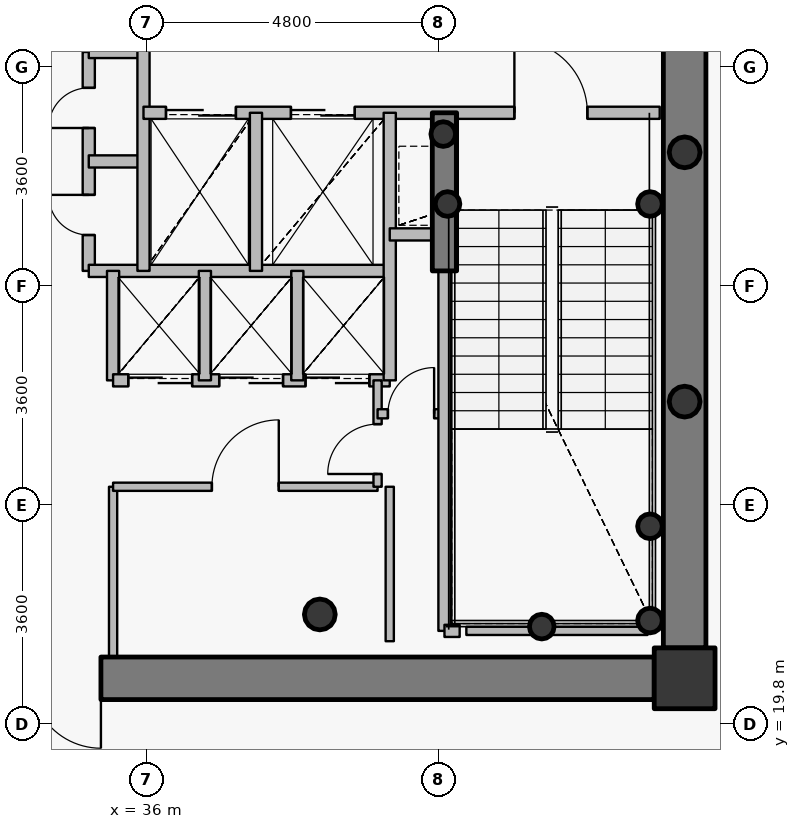
"""IFC4 building model, lengths in metres.
Left out: names, types, materials, properties, quantities, classifications, styles, units other than length and angle.
Written with IfcOpenShell. Run it as: python <this file> out.ifc"""

import sys

from ifc_helpers import new_model, si_unit, direction, frame, frame_2d, origin, origin_2d, place, context, subcontext, project, spatial, rectangle, hollow_circle, extrude, source, transform, mapped, element, fill, save


model = new_model("IFC4")
c1 = context("Model", 3, precision=1e-05, world=origin(), true_north=direction((0.0, 1.0)))
c2 = subcontext(c1, "Body", "Model", "MODEL_VIEW")
j1 = project(units=[si_unit("LENGTHUNIT", "METRE"), si_unit("PLANEANGLEUNIT", "RADIAN")], contexts=[c1])
p1 = place(None, origin())
s1 = spatial("IfcSite", under=j1, at=p1, CompositionType="ELEMENT")
p2 = place(p1, origin())
s2 = spatial("IfcBuilding", under=s1, at=p2, CompositionType="ELEMENT")
p3 = place(p2, frame((0.0, 0.0, 299.25)))
s3 = spatial("IfcBuildingStorey", under=s2, at=p3, CompositionType="ELEMENT", Elevation=299.25)
p4 = place(p3, frame((44.85, 20.55, 0.0), z_axis=(0.0, 0.0, 1.0), x_axis=(1.0, 0.0, 0.0)))
e1 = element("IfcColumn", 1, at=p4, inside=s3, PredefinedType="COLUMN", context=c2, shape_type="SweptSolid", body=[
    extrude(rectangle(XDim=1.0, YDim=1.0, at=origin_2d()), origin(), (0.0, 0.0, 1.0), 3.75),
])
p5 = place(p3, frame((38.85, 21.6, 0.0), z_axis=(0.0, 0.0, 1.0), x_axis=(1.0, 0.0, 0.0)))
e2 = element("IfcColumn", 2, at=p5, inside=s3, PredefinedType="COLUMN", context=c2, shape_type="SweptSolid", body=[
    extrude(hollow_circle(Radius=0.254, WallThickness=0.02, at=origin_2d()), origin(), (0.0, 0.0, 1.0), 3.75),
])
for number, where, z_axis, x_axis in (
    (3, (44.28, 21.5, 0.0), (0.0, 0.0, 1.0), (1.0, 0.0, 0.0)),
    (4, (44.28, 23.05, 0.0), (0.0, 0.0, 1.0), (1.0, 0.0, 0.0)),
    (5, (42.5, 21.4, 0.0), (0.0, 0.0, 1.0), (1.0, 0.0, 0.0)),
    (6, (40.95, 28.35, 0.0), (0.0, 0.0, 1.0), (1.0, 0.0, 0.0)),
    (7, (44.28, 28.35, 0.0), (0.0, 0.0, 1.0), (1.0, 0.0, 0.0)),
    (8, (40.88, 29.5, 0.0), (0.0, 0.0, 1.0), (1.0, 0.0, 0.0)),
):
    element("IfcColumn", number, at=place(p3, frame(where, z_axis=z_axis, x_axis=x_axis)), inside=s3, PredefinedType="COLUMN", context=c2, shape_type="SweptSolid", body=[
        extrude(hollow_circle(Radius=0.203, WallThickness=0.016, at=origin_2d()), origin(), (0.0, 0.0, 1.0), 3.75),
    ])
p6 = place(p3, frame((44.85, 32.95, 0.0), z_axis=(0.0, 0.0, 1.0), x_axis=(0.0, -1.0, 0.0)))
e9 = element("IfcWall", 9, at=p6, inside=s3, PredefinedType="SHEAR", context=c2, shape_type="SweptSolid", body=[
    extrude(rectangle(XDim=11.9, YDim=0.7, at=frame_2d((5.95, 0.0))), origin(), (0.0, 0.0, 1.0), 3.05),
])
p7 = place(p3, frame((44.35, 20.55, 0.0), z_axis=(0.0, 0.0, 1.0), x_axis=(-1.0, 0.0, 0.0)))
e10 = element("IfcWall", 10, at=p7, inside=s3, PredefinedType="SHEAR", context=c2, shape_type="SweptSolid", body=[
    extrude(rectangle(XDim=16.7, YDim=0.7, at=frame_2d((8.35, 0.0))), origin(), (0.0, 0.0, 1.0), 3.05),
])
p8 = place(p7, frame((12.925, 0.0, 0.0)))
e11 = element("IfcOpeningElement", 11, at=p8, cuts=e10, PredefinedType="OPENING", context=c2, shape_type="SweptSolid", body=[
    extrude(rectangle(XDim=1.15, YDim=2.15, at=origin_2d()), frame((0.575, 0.36, 1.075), z_axis=(0.0, -1.0, 0.0), x_axis=(1.0, 0.0, 0.0)), (0.0, 0.0, 1.0), 0.72),
])
p9 = place(p7, frame((9.1, 0.0, 0.0)))
e12 = element("IfcOpeningElement", 12, at=p9, cuts=e10, PredefinedType="OPENING", context=c2, shape_type="SweptSolid", body=[
    extrude(rectangle(XDim=1.15, YDim=2.15, at=origin_2d()), frame((0.575, 0.36, 1.075), z_axis=(0.0, -1.0, 0.0), x_axis=(1.0, 0.0, 0.0)), (0.0, 0.0, 1.0), 0.72),
])
p10 = place(p3, frame((40.9, 27.25, 0.0), z_axis=(0.0, 0.0, 1.0), x_axis=(0.0, 1.0, 0.0)))
e13 = element("IfcWall", 13, at=p10, inside=s3, PredefinedType="SHEAR", context=c2, shape_type="SweptSolid", body=[
    extrude(rectangle(XDim=2.6, YDim=0.4, at=frame_2d((1.3, 0.0))), origin(), (0.0, 0.0, 1.0), 3.1),
])
for number, where, z_axis, x_axis in (
    (14, (44.85, 25.1, 0.0), (0.0, 0.0, 1.0), (1.0, 0.0, 0.0)),
    (15, (44.85, 29.2, 0.0), (0.0, 0.0, 1.0), (1.0, 0.0, 0.0)),
):
    element("IfcColumn", number, at=place(p3, frame(where, z_axis=z_axis, x_axis=x_axis)), inside=s3, PredefinedType="COLUMN", context=c2, shape_type="SweptSolid", body=[
        extrude(hollow_circle(Radius=0.254, WallThickness=0.02, at=origin_2d()), origin(), (0.0, 0.0, 1.0), 3.75),
    ])
p11 = place(p3, frame((35.05, 27.25, 0.0), z_axis=(0.0, 0.0, 1.0), x_axis=(0.0, 1.0, 0.0)))
e16 = element("IfcWall", 16, at=p11, inside=s3, PredefinedType="PARTITIONING", context=c2, shape_type="SweptSolid", body=[
    extrude(rectangle(XDim=3.6, YDim=0.2, at=frame_2d((1.8, 0.0))), origin(), (0.0, 0.0, 1.0), 3.5),
])
p12 = place(p11, frame((0.59, 0.0, 0.0)))
e17 = element("IfcOpeningElement", 17, at=p12, cuts=e16, PredefinedType="OPENING", context=c2, shape_type="SweptSolid", body=[
    extrude(rectangle(XDim=0.66, YDim=2.05, at=origin_2d()), frame((0.33, 0.11, 1.025), z_axis=(0.0, -1.0, 0.0), x_axis=(1.0, 0.0, 0.0)), (0.0, 0.0, 1.0), 0.22),
])
p13 = place(p11, frame((2.35, 0.0, 0.0)))
e18 = element("IfcOpeningElement", 18, at=p13, cuts=e16, PredefinedType="OPENING", context=c2, shape_type="SweptSolid", body=[
    extrude(rectangle(XDim=0.66, YDim=2.05, at=origin_2d()), frame((0.33, 0.11, 1.025), z_axis=(0.0, -1.0, 0.0), x_axis=(1.0, 0.0, 0.0)), (0.0, 0.0, 1.0), 0.22),
])
p14 = place(p3, frame((35.05, 27.25, 0.0), z_axis=(0.0, 0.0, 1.0), x_axis=(1.0, 0.0, 0.0)))
e19 = element("IfcWall", 19, at=p14, inside=s3, PredefinedType="PARTITIONING", context=c2, shape_type="SweptSolid", body=[
    extrude(rectangle(XDim=4.95, YDim=0.2, at=frame_2d((2.475, 0.0))), origin(), (0.0, 0.0, 1.0), 3.085),
])
for number, where, z_axis, x_axis in (
    (20, (35.05, 29.05, 0.0), (0.0, 0.0, 1.0), (1.0, 0.0, 0.0)),
    (21, (35.05, 30.85, 0.0), (0.0, 0.0, 1.0), (1.0, 0.0, 0.0)),
):
    element("IfcWall", number, at=place(p3, frame(where, z_axis=z_axis, x_axis=x_axis)), inside=s3, PredefinedType="PARTITIONING", context=c2, shape_type="SweptSolid", body=[
        extrude(rectangle(XDim=0.9, YDim=0.2, at=frame_2d((0.45, 0.0))), origin(), (0.0, 0.0, 1.0), 3.5),
    ])
p15 = place(p3, frame((35.45, 20.9, 0.0), z_axis=(0.0, 0.0, 1.0), x_axis=(0.0, 1.0, 0.0)))
e22 = element("IfcWall", 22, at=p15, inside=s3, PredefinedType="PARTITIONING", context=c2, shape_type="SweptSolid", body=[
    extrude(rectangle(XDim=2.8, YDim=0.135, at=frame_2d((1.4, 0.0))), origin(), (0.0, 0.0, 1.0), 3.085),
])
p16 = place(p3, frame((35.45, 23.7, 0.0), z_axis=(0.0, 0.0, 1.0), x_axis=(1.0, 0.0, 0.0)))
e23 = element("IfcWall", 23, at=p16, inside=s3, PredefinedType="PARTITIONING", context=c2, shape_type="SweptSolid", body=[
    extrude(rectangle(XDim=4.35, YDim=0.135, at=frame_2d((2.175, 0.0))), origin(), (0.0, 0.0, 1.0), 3.085),
])
p17 = place(p16, frame((1.625, 0.0, 0.0)))
e24 = element("IfcOpeningElement", 24, at=p17, cuts=e23, PredefinedType="OPENING", context=c2, shape_type="SweptSolid", body=[
    extrude(rectangle(XDim=1.1, YDim=2.15, at=origin_2d()), frame((0.55, 0.078, 1.075), z_axis=(0.0, -1.0, 0.0), x_axis=(1.0, 0.0, 0.0)), (0.0, 0.0, 1.0), 0.155),
])
p18 = place(p3, frame((35.45, 25.45, 0.0), z_axis=(0.0, 0.0, 1.0), x_axis=(0.0, 1.0, 0.0)))
e25 = element("IfcWall", 25, at=p18, inside=s3, PredefinedType="PARTITIONING", context=c2, shape_type="SweptSolid", body=[
    extrude(rectangle(XDim=1.8, YDim=0.2, at=frame_2d((0.9, 0.0))), origin(), (0.0, 0.0, 1.0), 3.5),
])
p19 = place(p3, frame((35.45, 25.45, 0.0), z_axis=(0.0, 0.0, 1.0), x_axis=(1.0, 0.0, 0.0)))
e26 = element("IfcWall", 26, at=p19, inside=s3, PredefinedType="PARTITIONING", context=c2, shape_type="SweptSolid", body=[
    extrude(rectangle(XDim=4.55, YDim=0.2, at=frame_2d((2.275, 0.0))), origin(), (0.0, 0.0, 1.0), 3.085),
])
p20 = place(p19, frame((0.25, 0.0, 0.0)))
e27 = element("IfcOpeningElement", 27, at=p20, cuts=e26, PredefinedType="OPENING", context=c2, shape_type="SweptSolid", body=[
    extrude(rectangle(XDim=1.05, YDim=2.15, at=origin_2d()), frame((0.525, 0.11, 1.075), z_axis=(0.0, -1.0, 0.0), x_axis=(1.0, 0.0, 0.0)), (0.0, 0.0, 1.0), 0.22),
])
p21 = place(p19, frame((1.745, 0.0, 0.0)))
e28 = element("IfcOpeningElement", 28, at=p21, cuts=e26, PredefinedType="OPENING", context=c2, shape_type="SweptSolid", body=[
    extrude(rectangle(XDim=1.05, YDim=2.15, at=origin_2d()), frame((0.525, 0.11, 1.075), z_axis=(0.0, -1.0, 0.0), x_axis=(1.0, 0.0, 0.0)), (0.0, 0.0, 1.0), 0.22),
])
p22 = place(p19, frame((3.165, 0.0, 0.0)))
e29 = element("IfcOpeningElement", 29, at=p22, cuts=e26, PredefinedType="OPENING", context=c2, shape_type="SweptSolid", body=[
    extrude(rectangle(XDim=1.05, YDim=2.15, at=origin_2d()), frame((0.525, 0.11, 1.075), z_axis=(0.0, -1.0, 0.0), x_axis=(1.0, 0.0, 0.0)), (0.0, 0.0, 1.0), 0.22),
])
p23 = place(p3, frame((35.95, 27.25, 0.0), z_axis=(0.0, 0.0, 1.0), x_axis=(0.0, 1.0, 0.0)))
e30 = element("IfcWall", 30, at=p23, inside=s3, PredefinedType="PARTITIONING", context=c2, shape_type="SweptSolid", body=[
    extrude(rectangle(XDim=3.8, YDim=0.2, at=frame_2d((1.9, 0.0))), origin(), (0.0, 0.0, 1.0), 3.5),
])
p24 = place(p3, frame((35.95, 29.85, 0.0), z_axis=(0.0, 0.0, 1.0), x_axis=(1.0, 0.0, 0.0)))
e31 = element("IfcWall", 31, at=p24, inside=s3, PredefinedType="PARTITIONING", context=c2, shape_type="SweptSolid", body=[
    extrude(rectangle(XDim=8.49, YDim=0.2, at=frame_2d((4.245, 0.0))), origin(), (0.0, 0.0, 1.0), 3.085),
])
p25 = place(p24, frame((6.1, 0.0, 0.0)))
e32 = element("IfcOpeningElement", 32, at=p25, cuts=e31, PredefinedType="OPENING", context=c2, shape_type="SweptSolid", body=[
    extrude(rectangle(XDim=1.2, YDim=2.15, at=origin_2d()), frame((0.6, 0.11, 1.075), z_axis=(0.0, -1.0, 0.0), x_axis=(1.0, 0.0, 0.0)), (0.0, 0.0, 1.0), 0.22),
])
p26 = place(p24, frame((0.37, 0.0, 0.0)))
e33 = element("IfcOpeningElement", 33, at=p26, cuts=e31, PredefinedType="OPENING", context=c2, shape_type="SweptSolid", body=[
    extrude(rectangle(XDim=1.15, YDim=2.15, at=origin_2d()), frame((0.575, 0.11, 1.075), z_axis=(0.0, -1.0, 0.0), x_axis=(1.0, 0.0, 0.0)), (0.0, 0.0, 1.0), 0.22),
])
p27 = place(p24, frame((2.425, 0.0, 0.0)))
e34 = element("IfcOpeningElement", 34, at=p27, cuts=e31, PredefinedType="OPENING", context=c2, shape_type="SweptSolid", body=[
    extrude(rectangle(XDim=1.05, YDim=2.15, at=origin_2d()), frame((0.525, 0.11, 1.075), z_axis=(0.0, -1.0, 0.0), x_axis=(1.0, 0.0, 0.0)), (0.0, 0.0, 1.0), 0.22),
])
p28 = place(p3, frame((36.96, 25.45, 0.0), z_axis=(0.0, 0.0, 1.0), x_axis=(0.0, 1.0, 0.0)))
e35 = element("IfcWall", 35, at=p28, inside=s3, PredefinedType="PARTITIONING", context=c2, shape_type="SweptSolid", body=[
    extrude(rectangle(XDim=1.8, YDim=0.2, at=frame_2d((0.9, 0.0))), origin(), (0.0, 0.0, 1.0), 3.5),
])
p29 = place(p3, frame((37.8, 27.25, 0.0), z_axis=(0.0, 0.0, 1.0), x_axis=(0.0, 1.0, 0.0)))
e36 = element("IfcWall", 36, at=p29, inside=s3, PredefinedType="PARTITIONING", context=c2, shape_type="SweptSolid", body=[
    extrude(rectangle(XDim=2.6, YDim=0.2, at=frame_2d((1.3, 0.0))), origin(), (0.0, 0.0, 1.0), 3.5),
])
p30 = place(p3, frame((38.48, 25.45, 0.0), z_axis=(0.0, 0.0, 1.0), x_axis=(0.0, 1.0, 0.0)))
e37 = element("IfcWall", 37, at=p30, inside=s3, PredefinedType="PARTITIONING", context=c2, shape_type="SweptSolid", body=[
    extrude(rectangle(XDim=1.8, YDim=0.2, at=frame_2d((0.9, 0.0))), origin(), (0.0, 0.0, 1.0), 3.5),
])
p31 = place(p3, frame((39.8, 23.7, 0.0), z_axis=(0.0, 0.0, 1.0), x_axis=(0.0, 1.0, 0.0)))
e38 = element("IfcWall", 38, at=p31, inside=s3, PredefinedType="PARTITIONING", context=c2, shape_type="SweptSolid", body=[
    extrude(rectangle(XDim=1.75, YDim=0.135, at=frame_2d((0.875, 0.0))), origin(), (0.0, 0.0, 1.0), 3.5),
])
p32 = place(p31, frame((0.21, 0.0, 0.0)))
e39 = element("IfcOpeningElement", 39, at=p32, cuts=e38, PredefinedType="OPENING", context=c2, shape_type="SweptSolid", body=[
    extrude(rectangle(XDim=0.82, YDim=2.1, at=origin_2d()), frame((0.41, 0.078, 1.05), z_axis=(0.0, -1.0, 0.0), x_axis=(1.0, 0.0, 0.0)), (0.0, 0.0, 1.0), 0.155),
])
p33 = place(p3, frame((39.8, 24.9, 0.0), z_axis=(0.0, 0.0, 1.0), x_axis=(1.0, 0.0, 0.0)))
e40 = element("IfcWall", 40, at=p33, inside=s3, PredefinedType="PARTITIONING", context=c2, shape_type="SweptSolid", body=[
    extrude(rectangle(XDim=1.1, YDim=0.15, at=frame_2d((0.55, 0.0))), origin(), (0.0, 0.0, 1.0), 3.5),
])
p34 = place(p33, frame((0.17, 0.0, 0.0)))
e41 = element("IfcOpeningElement", 41, at=p34, cuts=e40, PredefinedType="OPENING", context=c2, shape_type="SweptSolid", body=[
    extrude(rectangle(XDim=0.76, YDim=2.1, at=origin_2d()), frame((0.38, 0.085, 1.05), z_axis=(0.0, -1.0, 0.0), x_axis=(1.0, 0.0, 0.0)), (0.0, 0.0, 1.0), 0.17),
])
p35 = place(p3, frame((40.0, 25.45, 0.0), z_axis=(0.0, 0.0, 1.0), x_axis=(0.0, 1.0, 0.0)))
e42 = element("IfcWall", 42, at=p35, inside=s3, PredefinedType="PARTITIONING", context=c2, shape_type="SweptSolid", body=[
    extrude(rectangle(XDim=4.4, YDim=0.2, at=frame_2d((2.2, 0.0))), origin(), (0.0, 0.0, 1.0), 3.5),
])
p36 = place(p3, frame((40.0, 27.85, 0.0), z_axis=(0.0, 0.0, 1.0), x_axis=(1.0, 0.0, 0.0)))
e43 = element("IfcWall", 43, at=p36, inside=s3, PredefinedType="PARTITIONING", context=c2, shape_type="SweptSolid", body=[
    extrude(rectangle(XDim=0.9, YDim=0.2, at=frame_2d((0.45, 0.0))), origin(), (0.0, 0.0, 1.0), 3.5),
])
p37 = place(p3, frame((40.9, 21.33, 0.0), z_axis=(0.0, 0.0, 1.0), x_axis=(0.0, 1.0, 0.0)))
e44 = element("IfcWall", 44, at=p37, inside=s3, PredefinedType="PARTITIONING", context=c2, shape_type="SweptSolid", body=[
    extrude(rectangle(XDim=5.91, YDim=0.2, at=frame_2d((2.955, 0.0))), origin(), (0.0, 0.0, 1.0), 3.035),
])
p38 = place(p3, frame((40.9, 21.33, 0.0), z_axis=(0.0, 0.0, 1.0), x_axis=(1.0, 0.0, 0.0)))
e45 = element("IfcWall", 45, at=p38, inside=s3, PredefinedType="PARTITIONING", context=c2, shape_type="SweptSolid", body=[
    extrude(rectangle(XDim=0.25, YDim=0.2, at=frame_2d((0.125, 0.0))), origin(), (0.0, 0.0, 1.0), 3.035),
])
p39 = place(p3, frame((44.24, 21.33, 0.0), z_axis=(0.0, 0.0, 1.0), x_axis=(-1.0, 0.0, 0.0)))
e46 = element("IfcWall", 46, at=p39, inside=s3, PredefinedType="PARTITIONING", context=c2, shape_type="SweptSolid", body=[
    extrude(rectangle(XDim=2.98, YDim=0.135, at=frame_2d((1.49, 0.0))), origin(), (0.0, 0.0, 1.0), 3.035),
])
p40 = place(p3, frame((40.0, 23.7, 0.0), z_axis=(0.0, 0.0, 1.0), x_axis=(0.0, -1.0, 0.0)))
e47 = element("IfcWall", 47, at=p40, inside=s3, PredefinedType="PARTITIONING", context=c2, shape_type="SweptSolid", body=[
    extrude(rectangle(XDim=2.54, YDim=0.135, at=frame_2d((1.27, 0.0))), origin(), (0.0, 0.0, 1.0), 3.035),
])
p41 = place(p3, frame((44.36, 20.2, 0.0), z_axis=(0.0, 0.0, 1.0), x_axis=(1.0, 0.0, 0.0)))
e48 = element("IfcWall", 48, at=p41, inside=s3, PredefinedType="PARTITIONING", context=c2, shape_type="SweptSolid", body=[
    extrude(rectangle(XDim=0.84, YDim=0.135, at=frame_2d((0.42, 0.0))), origin(), (0.0, 0.0, 1.0), 3.035),
])
p42 = place(p3, frame((45.2, 20.508, 0.0), z_axis=(0.0, 0.0, 1.0), x_axis=(0.0, 1.0, 0.0)))
e49 = element("IfcWall", 49, at=p42, inside=s3, PredefinedType="PARTITIONING", context=c2, shape_type="SweptSolid", body=[
    extrude(rectangle(XDim=0.532, YDim=0.135, at=frame_2d((0.266, 0.0))), origin(), (0.0, 0.0, 1.0), 3.5),
])
m1 = source(origin(), c2, "Body", "SweptSolid", [
    extrude(rectangle(XDim=1.15, YDim=2.15, at=origin_2d()), frame((0.575, 0.025, 1.075), z_axis=(0.0, -1.0, 0.0), x_axis=(1.0, 0.0, 0.0)), (0.0, 0.0, 1.0), 0.05),
])
p43 = place(p9, origin())
e50 = element("IfcDoor", 50, at=p43, inside=s3, OperationType="SINGLE_SWING_LEFT", PredefinedType="DOOR", context=c2, shape_type="MappedRepresentation", body=[
    mapped(m1, transform((0.0, 0.0, 0.0), x_axis=(1.0, 0.0, 0.0), y_axis=(0.0, 1.0, 0.0), z_axis=(0.0, 0.0, 1.0), scale=1.0)),
])
fill(e12, e50)
m2 = source(origin(), c2, "Body", "SweptSolid", [
    extrude(rectangle(XDim=1.2, YDim=2.15, at=origin_2d()), frame((0.6, 0.025, 1.075), z_axis=(0.0, -1.0, 0.0), x_axis=(1.0, 0.0, 0.0)), (0.0, 0.0, 1.0), 0.05),
])
p44 = place(p25, origin())
e51 = element("IfcDoor", 51, at=p44, inside=s3, OperationType="SINGLE_SWING_LEFT", PredefinedType="DOOR", context=c2, shape_type="MappedRepresentation", body=[
    mapped(m2, transform((0.0, 0.0, 0.0), x_axis=(1.0, 0.0, 0.0), y_axis=(0.0, 1.0, 0.0), z_axis=(0.0, 0.0, 1.0), scale=1.0)),
])
fill(e32, e51)
m3 = source(origin(), c2, "Body", "SweptSolid", [
    extrude(rectangle(XDim=1.15, YDim=2.15, at=origin_2d()), frame((0.575, 0.025, 1.075), z_axis=(0.0, -1.0, 0.0), x_axis=(1.0, 0.0, 0.0)), (0.0, 0.0, 1.0), 0.05),
])
p45 = place(p26, origin())
e52 = element("IfcDoor", 52, at=p45, inside=s3, OperationType="DOUBLE_DOOR_SLIDING", PredefinedType="USERDEFINED", context=c2, shape_type="MappedRepresentation", body=[
    mapped(m3, transform((0.0, 0.0, 0.0), x_axis=(1.0, 0.0, 0.0), y_axis=(0.0, 1.0, 0.0), z_axis=(0.0, 0.0, 1.0), scale=1.0)),
])
fill(e33, e52)
m4 = source(origin(), c2, "Body", "SweptSolid", [
    extrude(rectangle(XDim=1.05, YDim=2.15, at=origin_2d()), frame((0.525, 0.025, 1.075), z_axis=(0.0, -1.0, 0.0), x_axis=(1.0, 0.0, 0.0)), (0.0, 0.0, 1.0), 0.05),
])
p46 = place(p27, origin())
e53 = element("IfcDoor", 53, at=p46, inside=s3, OperationType="DOUBLE_DOOR_SLIDING", PredefinedType="USERDEFINED", context=c2, shape_type="MappedRepresentation", body=[
    mapped(m4, transform((0.0, 0.0, 0.0), x_axis=(1.0, 0.0, 0.0), y_axis=(0.0, 1.0, 0.0), z_axis=(0.0, 0.0, 1.0), scale=1.0)),
])
fill(e34, e53)
p47 = place(p20, origin())
e54 = element("IfcDoor", 54, at=p47, inside=s3, OperationType="DOUBLE_DOOR_SLIDING", PredefinedType="USERDEFINED", context=c2, shape_type="MappedRepresentation", body=[
    mapped(m4, transform((0.0, 0.0, 0.0), x_axis=(1.0, 0.0, 0.0), y_axis=(0.0, 1.0, 0.0), z_axis=(0.0, 0.0, 1.0), scale=1.0)),
])
fill(e27, e54)
p48 = place(p21, origin())
e55 = element("IfcDoor", 55, at=p48, inside=s3, OperationType="DOUBLE_DOOR_SLIDING", PredefinedType="USERDEFINED", context=c2, shape_type="MappedRepresentation", body=[
    mapped(m4, transform((0.0, 0.0, 0.0), x_axis=(1.0, 0.0, 0.0), y_axis=(0.0, 1.0, 0.0), z_axis=(0.0, 0.0, 1.0), scale=1.0)),
])
fill(e28, e55)
p49 = place(p22, origin())
e56 = element("IfcDoor", 56, at=p49, inside=s3, OperationType="DOUBLE_DOOR_SLIDING", PredefinedType="USERDEFINED", context=c2, shape_type="MappedRepresentation", body=[
    mapped(m4, transform((0.0, 0.0, 0.0), x_axis=(1.0, 0.0, 0.0), y_axis=(0.0, 1.0, 0.0), z_axis=(0.0, 0.0, 1.0), scale=1.0)),
])
fill(e29, e56)
m5 = source(origin(), c2, "Body", "SweptSolid", [
    extrude(rectangle(XDim=0.66, YDim=2.05, at=origin_2d()), frame((0.33, 0.025, 1.025), z_axis=(0.0, -1.0, 0.0), x_axis=(1.0, 0.0, 0.0)), (0.0, 0.0, 1.0), 0.05),
])
p50 = place(p12, origin())
e57 = element("IfcDoor", 57, at=p50, inside=s3, OperationType="SINGLE_SWING_RIGHT", PredefinedType="USERDEFINED", context=c2, shape_type="MappedRepresentation", body=[
    mapped(m5, transform((0.0, 0.0, 0.0), x_axis=(1.0, 0.0, 0.0), y_axis=(0.0, 1.0, 0.0), z_axis=(0.0, 0.0, 1.0), scale=1.0)),
])
fill(e17, e57)
p51 = place(p13, origin())
e58 = element("IfcDoor", 58, at=p51, inside=s3, OperationType="SINGLE_SWING_LEFT", PredefinedType="USERDEFINED", context=c2, shape_type="MappedRepresentation", body=[
    mapped(m5, transform((0.0, 0.0, 0.0), x_axis=(1.0, 0.0, 0.0), y_axis=(0.0, 1.0, 0.0), z_axis=(0.0, 0.0, 1.0), scale=1.0)),
])
fill(e18, e58)
m6 = source(origin(), c2, "Body", "SweptSolid", [
    extrude(rectangle(XDim=1.1, YDim=2.15, at=origin_2d()), frame((0.55, 0.025, 1.075), z_axis=(0.0, -1.0, 0.0), x_axis=(1.0, 0.0, 0.0)), (0.0, 0.0, 1.0), 0.05),
])
p52 = place(p17, origin())
e59 = element("IfcDoor", 59, at=p52, inside=s3, OperationType="SINGLE_SWING_RIGHT", PredefinedType="DOOR", context=c2, shape_type="MappedRepresentation", body=[
    mapped(m6, transform((0.0, 0.0, 0.0), x_axis=(1.0, 0.0, 0.0), y_axis=(0.0, 1.0, 0.0), z_axis=(0.0, 0.0, 1.0), scale=1.0)),
])
fill(e24, e59)
m7 = source(origin(), c2, "Body", "SweptSolid", [
    extrude(rectangle(XDim=0.82, YDim=2.1, at=origin_2d()), frame((0.41, 0.025, 1.05), z_axis=(0.0, -1.0, 0.0), x_axis=(1.0, 0.0, 0.0)), (0.0, 0.0, 1.0), 0.05),
])
p53 = place(p32, origin())
e60 = element("IfcDoor", 60, at=p53, inside=s3, OperationType="SINGLE_SWING_LEFT", PredefinedType="DOOR", context=c2, shape_type="MappedRepresentation", body=[
    mapped(m7, transform((0.0, 0.0, 0.0), x_axis=(1.0, 0.0, 0.0), y_axis=(0.0, 1.0, 0.0), z_axis=(0.0, 0.0, 1.0), scale=1.0)),
])
fill(e39, e60)
m8 = source(origin(), c2, "Body", "SweptSolid", [
    extrude(rectangle(XDim=0.76, YDim=2.1, at=origin_2d()), frame((0.38, 0.025, 1.05), z_axis=(0.0, -1.0, 0.0), x_axis=(1.0, 0.0, 0.0)), (0.0, 0.0, 1.0), 0.05),
])
p54 = place(p34, origin())
e61 = element("IfcDoor", 61, at=p54, inside=s3, OperationType="SINGLE_SWING_RIGHT", PredefinedType="DOOR", context=c2, shape_type="MappedRepresentation", body=[
    mapped(m8, transform((0.0, 0.0, 0.0), x_axis=(1.0, 0.0, 0.0), y_axis=(0.0, 1.0, 0.0), z_axis=(0.0, 0.0, 1.0), scale=1.0)),
])
fill(e41, e61)
save(model, sys.argv[1])
